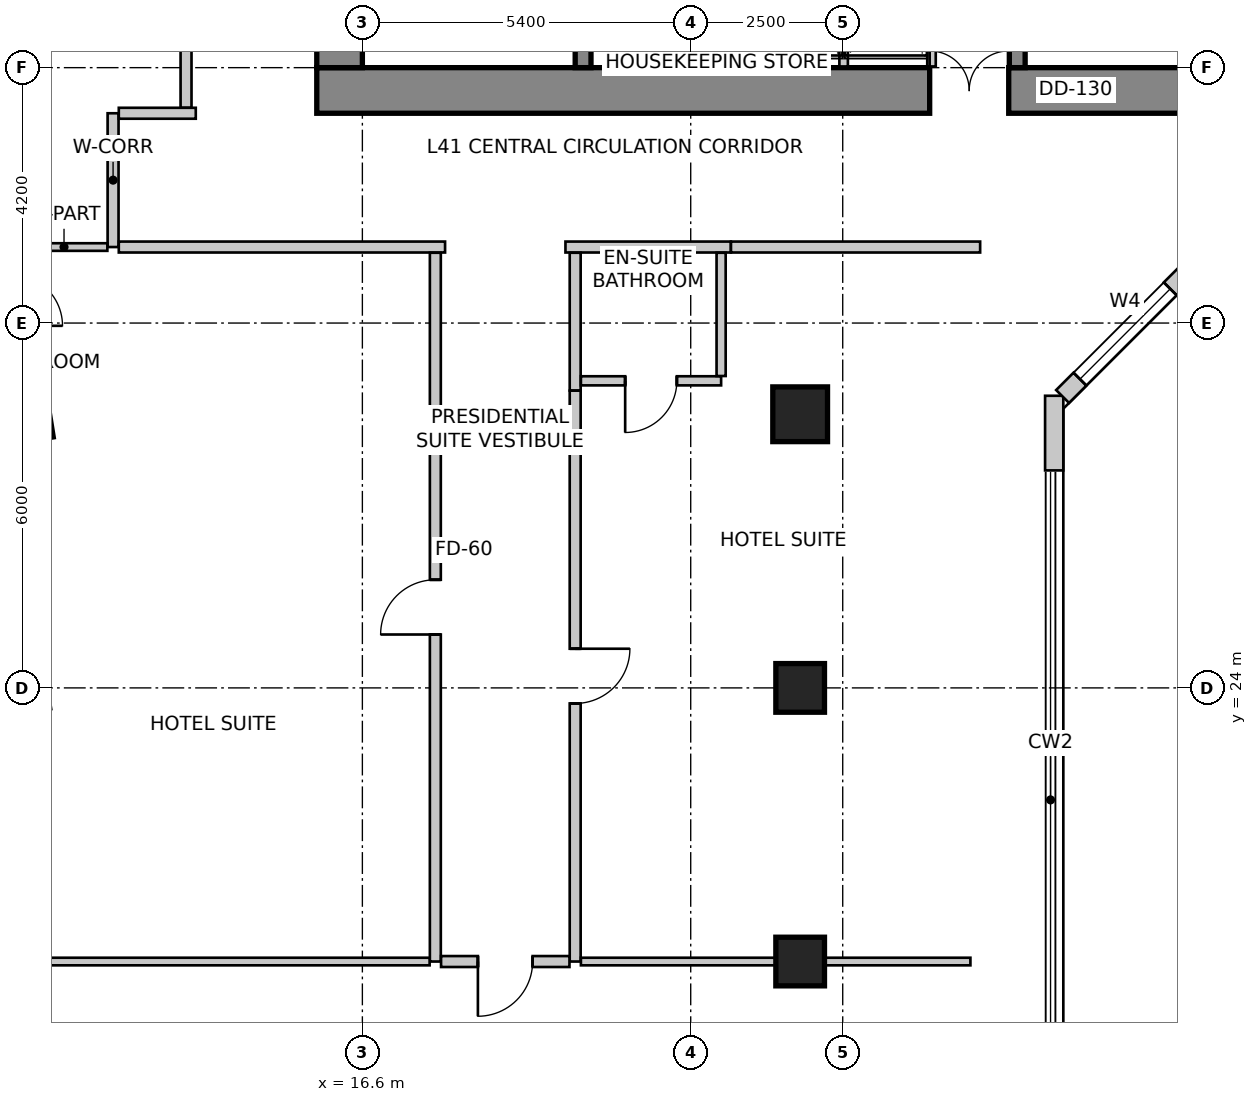
"""IFC4 building model, lengths in metres.
Left out: names, types, materials, properties, quantities, classifications, styles, units other than length and angle.
Written with IfcOpenShell. Run it as: python <this file> out.ifc"""

import sys

from ifc_helpers import new_model, si_unit, direction, frame, frame_2d, origin, origin_2d, place, context, subcontext, project, spatial, rectangle, extrude, source, transform, mapped, element, fill, save


model = new_model("IFC4")
c1 = context("Model", 3, precision=1e-05, world=origin(), true_north=direction((0.0, 1.0)))
c2 = subcontext(c1, "Body", "Model", "MODEL_VIEW")
j1 = project(units=[si_unit("LENGTHUNIT", "METRE"), si_unit("PLANEANGLEUNIT", "RADIAN")], contexts=[c1])
p1 = place(None, origin())
s1 = spatial("IfcSite", under=j1, at=p1, CompositionType="ELEMENT")
p2 = place(p1, origin())
s2 = spatial("IfcBuilding", under=s1, at=p2, CompositionType="ELEMENT")
p3 = place(p2, frame((0.0, 0.0, 164.6)))
s3 = spatial("IfcBuildingStorey", under=s2, at=p3, CompositionType="ELEMENT", Elevation=164.6)
p4 = place(p3, frame((15.85, 33.825, 0.0), z_axis=(0.0, 0.0, 1.0), x_axis=(1.0, 0.0, 0.0)))
e1 = element("IfcWall", 1, at=p4, inside=s3, PredefinedType="SHEAR", context=c2, shape_type="SweptSolid", body=[
    extrude(rectangle(XDim=15.9, YDim=0.75, at=frame_2d((7.95, 0.0))), origin(), (0.0, 0.0, 1.0), 3.6),
])
m1 = source(origin(), c2, "Body", "SweptSolid", [
    extrude(rectangle(XDim=1.3, YDim=2.15, at=frame_2d((0.65, 1.075))), frame((0.0, 0.385, 0.0), z_axis=(0.0, -1.0, 0.0), x_axis=(1.0, 0.0, 0.0)), (0.0, 0.0, 1.0), 0.77),
])
p5 = place(p4, frame((10.08, 0.0, 0.0)))
e2 = element("IfcOpeningElement", 2, at=p5, cuts=e1, PredefinedType="OPENING", context=c2, shape_type="MappedRepresentation", body=[
    mapped(m1, transform((0.0, 0.0, 0.0), scale=1.0)),
])
p6 = place(p3, frame((16.225, 34.2, 0.0), z_axis=(0.0, 0.0, 1.0), x_axis=(0.0, 1.0, 0.0)))
e3 = element("IfcWall", 3, at=p6, inside=s3, PredefinedType="SHEAR", context=c2, shape_type="SweptSolid", body=[
    extrude(rectangle(XDim=11.4, YDim=0.75, at=frame_2d((5.7, 0.0))), origin(), (0.0, 0.0, 1.0), 3.6),
])
m2 = source(origin(), c2, "Body", "SweptSolid", [
    extrude(rectangle(XDim=1.1, YDim=2.15, at=frame_2d((0.55, 1.075))), frame((0.0, 0.385, 0.0), z_axis=(0.0, -1.0, 0.0), x_axis=(1.0, 0.0, 0.0)), (0.0, 0.0, 1.0), 0.77),
])
p7 = place(p6, frame((7.15, 0.0, 0.0)))
e4 = element("IfcOpeningElement", 4, at=p7, cuts=e3, PredefinedType="OPENING", context=c2, shape_type="MappedRepresentation", body=[
    mapped(m2, transform((0.0, 0.0, 0.0), scale=1.0)),
])
p8 = place(p3, frame((20.23, 34.2, 0.0), z_axis=(0.0, 0.0, 1.0), x_axis=(0.0, 1.0, 0.0)))
e5 = element("IfcWall", 5, at=p8, inside=s3, PredefinedType="SHEAR", context=c2, shape_type="SweptSolid", body=[
    extrude(rectangle(XDim=9.06, YDim=0.26, at=frame_2d((4.53, 0.0))), origin(), (0.0, 0.0, 1.0), 3.6),
])
m3 = source(origin(), c2, "Body", "SweptSolid", [
    extrude(rectangle(XDim=1.1, YDim=2.15, at=frame_2d((0.55, 1.075))), frame((0.0, 0.14, 0.0), z_axis=(0.0, -1.0, 0.0), x_axis=(1.0, 0.0, 0.0)), (0.0, 0.0, 1.0), 0.28),
])
p9 = place(p8, frame((7.45, 0.0, 0.0)))
e6 = element("IfcOpeningElement", 6, at=p9, cuts=e5, PredefinedType="OPENING", context=c2, shape_type="MappedRepresentation", body=[
    mapped(m3, transform((0.0, 0.0, 0.0), scale=1.0)),
])
p10 = place(p3, frame((27.37, 34.2, 0.0), z_axis=(0.0, 0.0, 1.0), x_axis=(0.0, 1.0, 0.0)))
e7 = element("IfcWall", 7, at=p10, inside=s3, PredefinedType="SHEAR", context=c2, shape_type="SweptSolid", body=[
    extrude(rectangle(XDim=9.06, YDim=0.26, at=frame_2d((4.53, 0.0))), origin(), (0.0, 0.0, 1.0), 3.6),
])
p11 = place(p10, frame((7.45, 0.0, 0.0)))
e8 = element("IfcOpeningElement", 8, at=p11, cuts=e7, PredefinedType="OPENING", context=c2, shape_type="MappedRepresentation", body=[
    mapped(m3, transform((0.0, 0.0, 0.0), scale=1.0)),
])
m4 = source(origin(), c2, "Body", "SweptSolid", [
    extrude(rectangle(XDim=0.9, YDim=0.9, at=origin_2d()), origin(), (0.0, 0.0, 1.0), 3.6),
])
for number, where, z_axis, x_axis in (
    (9, (11.0, 28.5, 0.0), (0.0, 0.0, 1.0), (0.158, -0.987, 0.0)),
    (10, (23.8, 28.5, 0.0), (0.0, 0.0, 1.0), (1.0, 0.0, 0.0)),
):
    element("IfcColumn", number, at=place(p3, frame(where, z_axis=z_axis, x_axis=x_axis)), inside=s3, PredefinedType="COLUMN", context=c2, shape_type="MappedRepresentation", body=[
        mapped(m4, transform((0.0, 0.0, 0.0), scale=1.0)),
    ])
m5 = source(origin(), c2, "Body", "SweptSolid", [
    extrude(rectangle(XDim=0.8, YDim=0.8, at=origin_2d()), origin(), (0.0, 0.0, 1.0), 3.6),
])
for number, where, z_axis, x_axis in (
    (11, (23.8, 24.0, 0.0), (0.0, 0.0, 1.0), (1.0, 0.0, 0.0)),
    (12, (23.8, 19.5, 0.0), (0.0, 0.0, 1.0), (1.0, 0.0, 0.0)),
):
    element("IfcColumn", number, at=place(p3, frame(where, z_axis=z_axis, x_axis=x_axis)), inside=s3, PredefinedType="COLUMN", context=c2, shape_type="MappedRepresentation", body=[
        mapped(m5, transform((0.0, 0.0, 0.0), scale=1.0)),
    ])
p12 = place(p3, frame((27.978, 27.577, 0.0), z_axis=(0.0, 0.0, 1.0), x_axis=(0.0, 1.0, 0.0)))
e13 = element("IfcWall", 13, at=p12, inside=s3, PredefinedType="SOLIDWALL", context=c2, shape_type="SweptSolid", body=[
    extrude(rectangle(XDim=1.228, YDim=0.3, at=frame_2d((0.614, 0.0))), origin(), (0.0, 0.0, 1.0), 3.35),
])
p13 = place(p3, frame((28.116, 28.792, 0.0), z_axis=(0.0, 0.0, 1.0), x_axis=(0.707064797706, 0.707148762175, 0.0)))
e14 = element("IfcWall", 14, at=p13, inside=s3, PredefinedType="SOLIDWALL", context=c2, shape_type="SweptSolid", body=[
    extrude(rectangle(XDim=2.908, YDim=0.3, at=frame_2d((1.454, 0.0))), origin(), (0.0, 0.0, 1.0), 3.35),
])
m6 = source(origin(), c2, "Body", "SweptSolid", [
    extrude(rectangle(XDim=2.1, YDim=2.0, at=frame_2d((1.05, 1.0))), frame((0.0, 0.16, 0.0), z_axis=(0.0, -1.0, 0.0), x_axis=(1.0, 0.0, 0.0)), (0.0, 0.0, 1.0), 0.32),
])
p14 = place(p13, frame((0.404, 0.0, 0.85)))
e15 = element("IfcOpeningElement", 15, at=p14, cuts=e14, PredefinedType="OPENING", context=c2, shape_type="MappedRepresentation", body=[
    mapped(m6, transform((0.0, 0.0, 0.0), scale=1.0)),
])
p15 = place(p3, frame((13.269, 47.134, 0.0), z_axis=(0.0, 0.0, 1.0), x_axis=(-0.319929773322, -0.947441259468, 0.0)))
e16 = element("IfcWall", 16, at=p15, inside=s3, PredefinedType="SOLIDWALL", context=c2, shape_type="SweptSolid", body=[
    extrude(rectangle(XDim=16.134, YDim=0.3, at=frame_2d((8.067, 0.0))), origin(), (0.0, 0.0, 1.0), 3.35),
])
p16 = place(p15, frame((2.426, 0.0, 0.85)))
e17 = element("IfcOpeningElement", 17, at=p16, cuts=e16, PredefinedType="OPENING", context=c2, shape_type="MappedRepresentation", body=[
    mapped(m6, transform((0.0, 0.0, 0.0), scale=1.0)),
])
m7 = source(origin(), c2, "Body", "SweptSolid", [
    extrude(rectangle(XDim=2.4, YDim=2.2, at=frame_2d((1.2, 1.1))), frame((0.0, 0.16, 0.0), z_axis=(0.0, -1.0, 0.0), x_axis=(1.0, 0.0, 0.0)), (0.0, 0.0, 1.0), 0.32),
])
p17 = place(p15, frame((7.211, 0.0, 0.85)))
e18 = element("IfcOpeningElement", 18, at=p17, cuts=e16, PredefinedType="OPENING", context=c2, shape_type="MappedRepresentation", body=[
    mapped(m7, transform((0.0, 0.0, 0.0), scale=1.0)),
])
p18 = place(p15, frame((12.296, 0.0, 0.85)))
e19 = element("IfcOpeningElement", 19, at=p18, cuts=e16, PredefinedType="OPENING", context=c2, shape_type="MappedRepresentation", body=[
    mapped(m6, transform((0.0, 0.0, 0.0), scale=1.0)),
])
p19 = place(p3, frame((8.187, 31.834, 0.0), z_axis=(0.0, 0.0, 1.0), x_axis=(0.198869838988, -0.980025911464, 0.0)))
e20 = element("IfcWall", 20, at=p19, inside=s3, PredefinedType="SOLIDWALL", context=c2, shape_type="SweptSolid", body=[
    extrude(rectangle(XDim=16.363, YDim=0.3, at=frame_2d((8.182, 0.0))), origin(), (0.0, 0.0, 1.0), 3.35),
])
m8 = source(origin(), c2, "Body", "SweptSolid", [
    extrude(rectangle(XDim=1.6, YDim=2.15, at=frame_2d((0.8, 1.075))), frame((0.0, 0.16, 0.0), z_axis=(0.0, -1.0, 0.0), x_axis=(1.0, 0.0, 0.0)), (0.0, 0.0, 1.0), 0.32),
])
p20 = place(p19, frame((9.459, 0.0, 0.0)))
e21 = element("IfcOpeningElement", 21, at=p20, cuts=e20, PredefinedType="OPENING", context=c2, shape_type="MappedRepresentation", body=[
    mapped(m8, transform((0.0, 0.0, 0.0), scale=1.0)),
])
m9 = source(origin(), c2, "Body", "SweptSolid", [
    extrude(rectangle(XDim=1.5, YDim=1.8, at=frame_2d((0.75, 0.9))), frame((0.0, 0.16, 0.0), z_axis=(0.0, -1.0, 0.0), x_axis=(1.0, 0.0, 0.0)), (0.0, 0.0, 1.0), 0.32),
])
p21 = place(p19, frame((0.981, 0.0, 0.85)))
e22 = element("IfcOpeningElement", 22, at=p21, cuts=e20, PredefinedType="OPENING", context=c2, shape_type="MappedRepresentation", body=[
    mapped(m9, transform((0.0, 0.0, 0.0), scale=1.0)),
])
p22 = place(p19, frame((4.921, 0.0, 0.85)))
e23 = element("IfcOpeningElement", 23, at=p22, cuts=e20, PredefinedType="OPENING", context=c2, shape_type="MappedRepresentation", body=[
    mapped(m7, transform((0.0, 0.0, 0.0), scale=1.0)),
])
p23 = place(p19, frame((13.236, 0.0, 0.85)))
e24 = element("IfcOpeningElement", 24, at=p23, cuts=e20, PredefinedType="OPENING", context=c2, shape_type="MappedRepresentation", body=[
    mapped(m7, transform((0.0, 0.0, 0.0), scale=1.0)),
])
for number, where, z_axis, x_axis in (
    (25, (25.96, 34.22, 0.0), (0.0, 0.0, 1.0), (0.0, 1.0, 0.0)),
    (26, (23.07, 34.22, 0.0), (0.0, 0.0, 1.0), (0.0, 1.0, 0.0)),
    (27, (24.515, 34.22, 0.0), (0.0, 0.0, 1.0), (0.0, 1.0, 0.0)),
):
    element("IfcWall", number, at=place(p3, frame(where, z_axis=z_axis, x_axis=x_axis)), inside=s3, PredefinedType="SOLIDWALL", context=c2, shape_type="SweptSolid", body=[
        extrude(rectangle(XDim=1.62, YDim=0.14, at=frame_2d((0.81, 0.0))), origin(), (0.0, 0.0, 1.0), 2.642),
    ])
p24 = place(p3, frame((12.5, 31.25, 0.0), z_axis=(0.0, 0.0, 1.0), x_axis=(0.0, 1.0, 0.0)))
e28 = element("IfcWall", 28, at=p24, inside=s3, PredefinedType="PARTITIONING", context=c2, shape_type="SweptSolid", body=[
    extrude(rectangle(XDim=2.2, YDim=0.18, at=frame_2d((1.1, 0.0))), origin(), (0.0, 0.0, 1.0), 3.034),
])
p25 = place(p3, frame((12.594, 33.45, 0.0), z_axis=(0.0, 0.0, 1.0), x_axis=(1.0, 0.0, 0.0)))
e29 = element("IfcWall", 29, at=p25, inside=s3, PredefinedType="PARTITIONING", context=c2, shape_type="SweptSolid", body=[
    extrude(rectangle(XDim=1.266, YDim=0.18, at=frame_2d((0.633, 0.0))), origin(), (0.0, 0.0, 1.0), 3.35),
])
p26 = place(p3, frame((17.96, 31.25, 0.0), z_axis=(0.0, 0.0, 1.0), x_axis=(-1.0, 0.0, 0.0)))
e30 = element("IfcWall", 30, at=p26, inside=s3, PredefinedType="PARTITIONING", context=c2, shape_type="SweptSolid", body=[
    extrude(rectangle(XDim=5.366, YDim=0.18, at=frame_2d((2.683, 0.0))), origin(), (0.0, 0.0, 1.0), 3.034),
])
p27 = place(p3, frame((22.66, 31.25, 0.0), z_axis=(0.0, 0.0, 1.0), x_axis=(-1.0, 0.0, 0.0)))
e31 = element("IfcWall", 31, at=p27, inside=s3, PredefinedType="PARTITIONING", context=c2, shape_type="SweptSolid", body=[
    extrude(rectangle(XDim=2.72, YDim=0.18, at=frame_2d((1.36, 0.0))), origin(), (0.0, 0.0, 1.0), 3.034),
])
p28 = place(p3, frame((26.76, 31.25, 0.0), z_axis=(0.0, 0.0, 1.0), x_axis=(-1.0, 0.0, 0.0)))
e32 = element("IfcWall", 32, at=p28, inside=s3, PredefinedType="PARTITIONING", context=c2, shape_type="SweptSolid", body=[
    extrude(rectangle(XDim=4.098, YDim=0.18, at=frame_2d((2.049, 0.0))), origin(), (0.0, 0.0, 1.0), 3.35),
])
p29 = place(p3, frame((13.7, 33.544, 0.0), z_axis=(0.0, 0.0, 1.0), x_axis=(0.0, 1.0, 0.0)))
e33 = element("IfcWall", 33, at=p29, inside=s3, PredefinedType="PARTITIONING", context=c2, shape_type="SweptSolid", body=[
    extrude(rectangle(XDim=13.86, YDim=0.18, at=frame_2d((6.93, 0.0))), origin(), (0.0, 0.0, 1.0), 2.492),
])
m10 = source(origin(), c2, "Body", "SweptSolid", [
    extrude(rectangle(XDim=0.9, YDim=2.15, at=frame_2d((0.45, 1.075))), frame((0.0, 0.1, 0.0), z_axis=(0.0, -1.0, 0.0), x_axis=(1.0, 0.0, 0.0)), (0.0, 0.0, 1.0), 0.2),
])
p30 = place(p29, frame((4.253, 0.0, 0.0)))
e34 = element("IfcOpeningElement", 34, at=p30, cuts=e33, PredefinedType="OPENING", context=c2, shape_type="MappedRepresentation", body=[
    mapped(m10, transform((0.0, 0.0, 0.0), scale=1.0)),
])
p31 = place(p3, frame((12.406, 31.25, 0.0), z_axis=(0.0, 0.0, 1.0), x_axis=(-1.0, 0.0, 0.0)))
e35 = element("IfcWall", 35, at=p31, inside=s3, PredefinedType="PARTITIONING", context=c2, shape_type="SweptSolid", body=[
    extrude(rectangle(XDim=1.426, YDim=0.125, at=frame_2d((0.713, 0.0))), origin(), (0.0, 0.0, 1.0), 2.492),
])
p32 = place(p3, frame((17.8, 19.5, 0.0), z_axis=(0.0, 0.0, 1.0), x_axis=(0.0, 1.0, 0.0)))
e36 = element("IfcWall", 36, at=p32, inside=s3, PredefinedType="PARTITIONING", context=c2, shape_type="SweptSolid", body=[
    extrude(rectangle(XDim=11.656, YDim=0.18, at=frame_2d((5.828, 0.0))), origin(), (0.0, 0.0, 1.0), 2.803),
])
p33 = place(p32, frame((5.378, 0.0, 0.0)))
e37 = element("IfcOpeningElement", 37, at=p33, cuts=e36, PredefinedType="OPENING", context=c2, shape_type="MappedRepresentation", body=[
    mapped(m10, transform((0.0, 0.0, 0.0), scale=1.0)),
])
p34 = place(p3, frame((20.1, 31.156, 0.0), z_axis=(0.0, 0.0, 1.0), x_axis=(0.0, -1.0, 0.0)))
e38 = element("IfcWall", 38, at=p34, inside=s3, PredefinedType="PARTITIONING", context=c2, shape_type="SweptSolid", body=[
    extrude(rectangle(XDim=2.266, YDim=0.18, at=frame_2d((1.133, 0.0))), origin(), (0.0, 0.0, 1.0), 3.034),
])
p35 = place(p3, frame((20.1, 28.888, 0.0), z_axis=(0.0, 0.0, 1.0), x_axis=(0.0, -1.0, 0.0)))
e39 = element("IfcWall", 39, at=p35, inside=s3, PredefinedType="PARTITIONING", context=c2, shape_type="SweptSolid", body=[
    extrude(rectangle(XDim=9.388, YDim=0.18, at=frame_2d((4.694, 0.0))), origin(), (0.0, 0.0, 1.0), 2.803),
])
p36 = place(p35, frame((4.244, 0.0, 0.0)))
e40 = element("IfcOpeningElement", 40, at=p36, cuts=e39, PredefinedType="OPENING", context=c2, shape_type="MappedRepresentation", body=[
    mapped(m10, transform((0.0, 0.0, 0.0), scale=1.0)),
])
p37 = place(p3, frame((20.006, 19.5, 0.0), z_axis=(0.0, 0.0, 1.0), x_axis=(-1.0, 0.0, 0.0)))
e41 = element("IfcWall", 41, at=p37, inside=s3, PredefinedType="PARTITIONING", context=c2, shape_type="SweptSolid", body=[
    extrude(rectangle(XDim=2.112, YDim=0.18, at=frame_2d((1.056, 0.0))), origin(), (0.0, 0.0, 1.0), 3.35),
])
p38 = place(p37, frame((0.606, 0.0, 0.0)))
e42 = element("IfcOpeningElement", 42, at=p38, cuts=e41, PredefinedType="OPENING", context=c2, shape_type="MappedRepresentation", body=[
    mapped(m10, transform((0.0, 0.0, 0.0), scale=1.0)),
])
p39 = place(p3, frame((17.706, 19.5, 0.0), z_axis=(0.0, 0.0, 1.0), x_axis=(-1.0, 0.0, 0.0)))
e43 = element("IfcWall", 43, at=p39, inside=s3, PredefinedType="PARTITIONING", context=c2, shape_type="SweptSolid", body=[
    extrude(rectangle(XDim=6.899, YDim=0.125, at=frame_2d((3.45, 0.0))), origin(), (0.0, 0.0, 1.0), 3.35),
])
p40 = place(p3, frame((22.5, 29.05, 0.0), z_axis=(0.0, 0.0, 1.0), x_axis=(-1.0, 0.0, 0.0)))
e44 = element("IfcWall", 44, at=p40, inside=s3, PredefinedType="PARTITIONING", context=c2, shape_type="SweptSolid", body=[
    extrude(rectangle(XDim=2.306, YDim=0.15, at=frame_2d((1.153, 0.0))), origin(), (0.0, 0.0, 1.0), 3.034),
])
m11 = source(origin(), c2, "Body", "SweptSolid", [
    extrude(rectangle(XDim=0.85, YDim=2.15, at=frame_2d((0.425, 1.075))), frame((0.0, 0.085, 0.0), z_axis=(0.0, -1.0, 0.0), x_axis=(1.0, 0.0, 0.0)), (0.0, 0.0, 1.0), 0.17),
])
p41 = place(p40, frame((0.728, 0.0, 0.0)))
e45 = element("IfcOpeningElement", 45, at=p41, cuts=e44, PredefinedType="OPENING", context=c2, shape_type="MappedRepresentation", body=[
    mapped(m11, transform((0.0, 0.0, 0.0), scale=1.0)),
])
p42 = place(p3, frame((22.5, 31.156, 0.0), z_axis=(0.0, 0.0, 1.0), x_axis=(0.0, -1.0, 0.0)))
e46 = element("IfcWall", 46, at=p42, inside=s3, PredefinedType="PARTITIONING", context=c2, shape_type="SweptSolid", body=[
    extrude(rectangle(XDim=2.027, YDim=0.15, at=frame_2d((1.014, 0.0))), origin(), (0.0, 0.0, 1.0), 3.034),
])
p43 = place(p3, frame((26.6, 19.5, 0.0), z_axis=(0.0, 0.0, 1.0), x_axis=(-1.0, 0.0, 0.0)))
e47 = element("IfcWall", 47, at=p43, inside=s3, PredefinedType="PARTITIONING", context=c2, shape_type="SweptSolid", body=[
    extrude(rectangle(XDim=6.406, YDim=0.125, at=frame_2d((3.203, 0.0))), origin(), (0.0, 0.0, 1.0), 2.492),
])
m12 = source(origin(), c2, "Body", "SweptSolid", [
    extrude(rectangle(XDim=2.1, YDim=2.0, at=frame_2d((1.05, 1.0))), frame((0.0, -0.015, 0.0), z_axis=(0.0, -1.0, 0.0), x_axis=(1.0, 0.0, 0.0)), (0.0, 0.0, 1.0), 0.06),
])
p44 = place(p14, origin())
e48 = element("IfcWindow", 48, at=p44, inside=s3, PartitioningType="SINGLE_PANEL", PredefinedType="WINDOW", context=c2, shape_type="MappedRepresentation", body=[
    mapped(m12, transform((0.0, 0.0, 0.0), scale=1.0)),
])
fill(e15, e48)
m13 = source(origin(), c2, "Body", "SweptSolid", [
    extrude(rectangle(XDim=1.3, YDim=2.15, at=frame_2d((0.65, 1.075))), frame((0.0, 0.025, 0.0), z_axis=(0.0, -1.0, 0.0), x_axis=(1.0, 0.0, 0.0)), (0.0, 0.0, 1.0), 0.05),
])
p45 = place(p5, origin())
e49 = element("IfcDoor", 49, at=p45, inside=s3, OperationType="DOUBLE_DOOR_SINGLE_SWING", PredefinedType="DOOR", context=c2, shape_type="MappedRepresentation", body=[
    mapped(m13, transform((0.0, 0.0, 0.0), scale=1.0)),
])
fill(e2, e49)
m14 = source(origin(), c2, "Body", "SweptSolid", [
    extrude(rectangle(XDim=0.9, YDim=2.15, at=frame_2d((0.45, 1.075))), frame((0.0, 0.025, 0.0), z_axis=(0.0, -1.0, 0.0), x_axis=(1.0, 0.0, 0.0)), (0.0, 0.0, 1.0), 0.05),
])
p46 = place(p33, origin())
e50 = element("IfcDoor", 50, at=p46, inside=s3, OperationType="SINGLE_SWING_LEFT", PredefinedType="DOOR", context=c2, shape_type="MappedRepresentation", body=[
    mapped(m14, transform((0.0, 0.0, 0.0), scale=1.0)),
])
fill(e37, e50)
m15 = source(origin(), c2, "Body", "SweptSolid", [
    extrude(rectangle(XDim=0.85, YDim=2.15, at=frame_2d((0.425, 1.075))), frame((0.0, 0.025, 0.0), z_axis=(0.0, -1.0, 0.0), x_axis=(1.0, 0.0, 0.0)), (0.0, 0.0, 1.0), 0.05),
])
p47 = place(p41, origin())
e51 = element("IfcDoor", 51, at=p47, inside=s3, OperationType="SINGLE_SWING_RIGHT", PredefinedType="DOOR", context=c2, shape_type="MappedRepresentation", body=[
    mapped(m15, transform((0.0, 0.0, 0.0), scale=1.0)),
])
fill(e45, e51)
p48 = place(p36, origin())
e52 = element("IfcDoor", 52, at=p48, inside=s3, OperationType="SINGLE_SWING_LEFT", PredefinedType="DOOR", context=c2, shape_type="MappedRepresentation", body=[
    mapped(m14, transform((0.0, 0.0, 0.0), scale=1.0)),
])
fill(e40, e52)
m16 = source(origin(), c2, "Body", "SweptSolid", [
    extrude(rectangle(XDim=0.9, YDim=2.15, at=frame_2d((0.45, 1.075))), frame((0.0, 0.025, 0.0), z_axis=(0.0, -1.0, 0.0), x_axis=(1.0, 0.0, 0.0)), (0.0, 0.0, 1.0), 0.05),
])
p49 = place(p38, origin())
e53 = element("IfcDoor", 53, at=p49, inside=s3, OperationType="SINGLE_SWING_RIGHT", PredefinedType="DOOR", context=c2, shape_type="MappedRepresentation", body=[
    mapped(m16, transform((0.0, 0.0, 0.0), scale=1.0)),
])
fill(e42, e53)
save(model, sys.argv[1])
